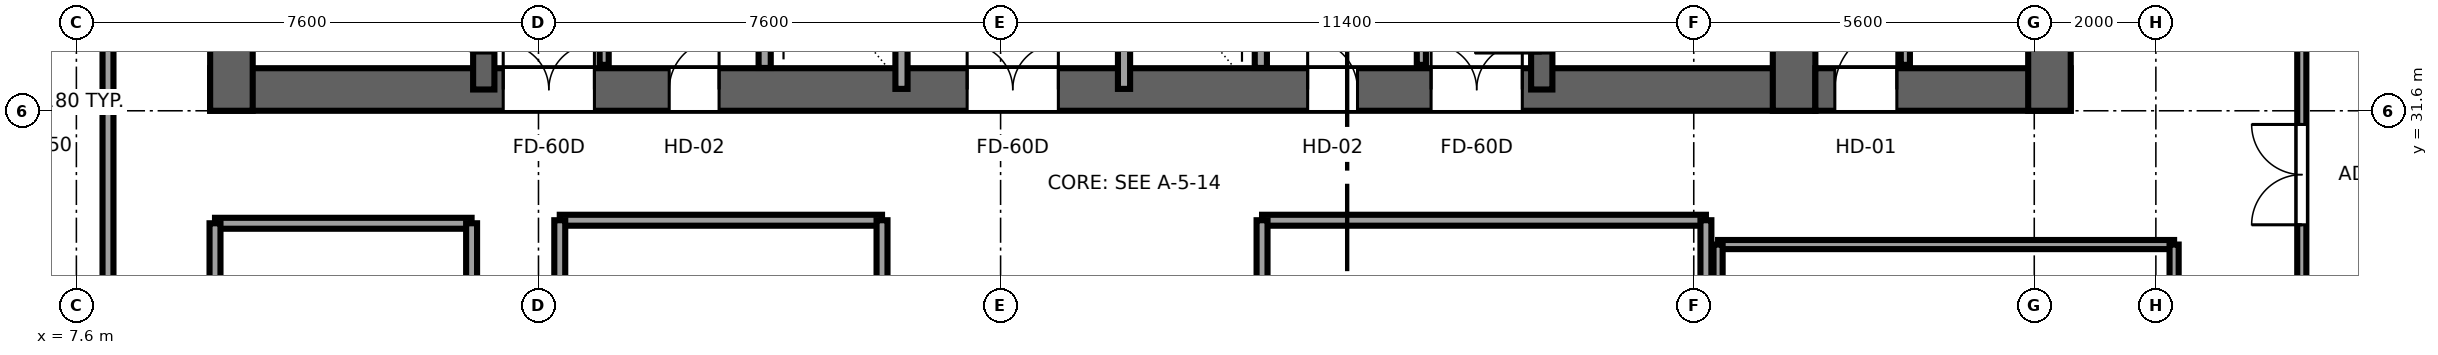
"""IFC4 building model, lengths in metres.
Left out: names, types, materials, properties, quantities, classifications, styles, units other than length and angle.
Written with IfcOpenShell. Run it as: python <this file> out.ifc"""

import sys

from ifc_helpers import new_model, si_unit, direction, frame, frame_2d, origin, place, context, subcontext, project, spatial, rectangle, extrude, source, transform, mapped, element, fill, save


model = new_model("IFC4")
c1 = context("Model", 3, precision=1e-05, world=origin(), true_north=direction((0.0, 1.0)))
c2 = subcontext(c1, "Body", "Model", "MODEL_VIEW")
j1 = project(units=[si_unit("LENGTHUNIT", "METRE"), si_unit("PLANEANGLEUNIT", "RADIAN")], contexts=[c1])
p1 = place(None, origin())
s1 = spatial("IfcSite", under=j1, at=p1, CompositionType="ELEMENT")
p2 = place(p1, origin())
s2 = spatial("IfcBuilding", under=s1, at=p2, CompositionType="ELEMENT")
p3 = place(p2, frame((0.0, 0.0, 191.1)))
s3 = spatial("IfcBuildingStorey", under=s2, at=p3, CompositionType="ELEMENT", Elevation=191.1)
p4 = place(p3, frame((9.8, 31.95, 0.0), z_axis=(0.0, 0.0, 1.0), x_axis=(1.0, 0.0, 0.0)))
e1 = element("IfcWall", 1, at=p4, inside=s3, PredefinedType="SHEAR", context=c2, shape_type="SweptSolid", body=[
    extrude(rectangle(XDim=26.4, YDim=0.7, at=frame_2d((13.2, 0.0))), origin(), (0.0, 0.0, 1.0), 3.55),
])
p5 = place(p4, frame((6.32, 0.0, 0.0), z_axis=(0.0, 0.0, 1.0), x_axis=(-1.0, 0.0, 0.0)))
e2 = element("IfcOpeningElement", 2, at=p5, cuts=e1, PredefinedType="OPENING", context=c2, shape_type="SweptSolid", body=[
    extrude(rectangle(XDim=1.5, YDim=2.04, at=frame_2d((0.75, 1.02))), frame((0.0, 0.36, 0.0), z_axis=(0.0, -1.0, 0.0), x_axis=(1.0, 0.0, 0.0)), (0.0, 0.0, 1.0), 0.72),
])
p6 = place(p4, frame((13.95, 0.0, 0.0), z_axis=(0.0, 0.0, 1.0), x_axis=(-1.0, 0.0, 0.0)))
e3 = element("IfcOpeningElement", 3, at=p6, cuts=e1, PredefinedType="OPENING", context=c2, shape_type="SweptSolid", body=[
    extrude(rectangle(XDim=1.5, YDim=2.04, at=frame_2d((0.75, 1.02))), frame((0.0, 0.36, 0.0), z_axis=(0.0, -1.0, 0.0), x_axis=(1.0, 0.0, 0.0)), (0.0, 0.0, 1.0), 0.72),
])
p7 = place(p4, frame((21.58, 0.0, 0.0), z_axis=(0.0, 0.0, 1.0), x_axis=(-1.0, 0.0, 0.0)))
e4 = element("IfcOpeningElement", 4, at=p7, cuts=e1, PredefinedType="OPENING", context=c2, shape_type="SweptSolid", body=[
    extrude(rectangle(XDim=1.5, YDim=2.04, at=frame_2d((0.75, 1.02))), frame((0.0, 0.36, 0.0), z_axis=(0.0, -1.0, 0.0), x_axis=(1.0, 0.0, 0.0)), (0.0, 0.0, 1.0), 0.72),
])
p8 = place(p4, frame((8.37, 0.0, 0.0), z_axis=(0.0, 0.0, 1.0), x_axis=(-1.0, 0.0, 0.0)))
e5 = element("IfcOpeningElement", 5, at=p8, cuts=e1, PredefinedType="OPENING", context=c2, shape_type="SweptSolid", body=[
    extrude(rectangle(XDim=0.82, YDim=2.01, at=frame_2d((0.41, 1.005))), frame((0.0, 0.36, 0.0), z_axis=(0.0, -1.0, 0.0), x_axis=(1.0, 0.0, 0.0)), (0.0, 0.0, 1.0), 0.72),
])
p9 = place(p4, frame((18.87, 0.0, 0.0), z_axis=(0.0, 0.0, 1.0), x_axis=(-1.0, 0.0, 0.0)))
e6 = element("IfcOpeningElement", 6, at=p9, cuts=e1, PredefinedType="OPENING", context=c2, shape_type="SweptSolid", body=[
    extrude(rectangle(XDim=0.82, YDim=2.01, at=frame_2d((0.41, 1.005))), frame((0.0, 0.36, 0.0), z_axis=(0.0, -1.0, 0.0), x_axis=(1.0, 0.0, 0.0)), (0.0, 0.0, 1.0), 0.72),
])
for number, where, z_axis, x_axis in (
    (7, (10.15, 31.6, 0.0), (0.0, 0.0, 1.0), (0.0, 1.0, 0.0)),
    (8, (35.85, 31.6, 0.0), (0.0, 0.0, 1.0), (0.0, 1.0, 0.0)),
):
    element("IfcWall", number, at=place(p3, frame(where, z_axis=z_axis, x_axis=x_axis)), inside=s3, PredefinedType="SHEAR", context=c2, shape_type="SweptSolid", body=[
        extrude(rectangle(XDim=13.6, YDim=0.7, at=frame_2d((6.8, 0.0))), origin(), (0.0, 0.0, 1.0), 3.55),
    ])
p10 = place(p3, frame((14.3, 31.95, 0.0), z_axis=(0.0, 0.0, 1.0), x_axis=(0.0, 1.0, 0.0)))
e9 = element("IfcWall", 9, at=p10, inside=s3, PredefinedType="SHEAR", context=c2, shape_type="SweptSolid", body=[
    extrude(rectangle(XDim=12.9, YDim=0.35, at=frame_2d((6.45, 0.0))), origin(), (0.0, 0.0, 1.0), 3.55),
])
p11 = place(p10, frame((0.6, 0.0, 0.0)))
e10 = element("IfcOpeningElement", 10, at=p11, cuts=e9, PredefinedType="OPENING", context=c2, shape_type="SweptSolid", body=[
    extrude(rectangle(XDim=1.1, YDim=2.12, at=frame_2d((0.55, 1.06))), frame((0.0, 0.185, 0.0), z_axis=(0.0, -1.0, 0.0), x_axis=(1.0, 0.0, 0.0)), (0.0, 0.0, 1.0), 0.37),
])
p12 = place(p3, frame((31.7, 31.95, 0.0), z_axis=(0.0, 0.0, 1.0), x_axis=(0.0, 1.0, 0.0)))
e11 = element("IfcWall", 11, at=p12, inside=s3, PredefinedType="SHEAR", context=c2, shape_type="SweptSolid", body=[
    extrude(rectangle(XDim=12.9, YDim=0.35, at=frame_2d((6.45, 0.0))), origin(), (0.0, 0.0, 1.0), 3.55),
])
p13 = place(p12, frame((1.7, 0.0, 0.0), z_axis=(0.0, 0.0, 1.0), x_axis=(-1.0, 0.0, 0.0)))
e12 = element("IfcOpeningElement", 12, at=p13, cuts=e11, PredefinedType="OPENING", context=c2, shape_type="SweptSolid", body=[
    extrude(rectangle(XDim=1.1, YDim=2.12, at=frame_2d((0.55, 1.06))), frame((0.0, 0.185, 0.0), z_axis=(0.0, -1.0, 0.0), x_axis=(1.0, 0.0, 0.0)), (0.0, 0.0, 1.0), 0.37),
])
p14 = place(p3, frame((36.2, 31.95, 0.0), z_axis=(0.0, 0.0, 1.0), x_axis=(1.0, 0.0, 0.0)))
e13 = element("IfcWall", 13, at=p14, inside=s3, PredefinedType="SHEAR", context=c2, shape_type="SweptSolid", body=[
    extrude(rectangle(XDim=4.2, YDim=0.7, at=frame_2d((2.1, 0.0))), origin(), (0.0, 0.0, 1.0), 3.55),
])
p15 = place(p14, frame((1.34, 0.0, 0.0), z_axis=(0.0, 0.0, 1.0), x_axis=(-1.0, 0.0, 0.0)))
e14 = element("IfcOpeningElement", 14, at=p15, cuts=e13, PredefinedType="OPENING", context=c2, shape_type="SweptSolid", body=[
    extrude(rectangle(XDim=1.02, YDim=2.03, at=frame_2d((0.51, 1.015))), frame((0.0, 0.36, 0.0), z_axis=(0.0, -1.0, 0.0), x_axis=(1.0, 0.0, 0.0)), (0.0, 0.0, 1.0), 0.72),
])
p16 = place(p3, frame((40.05, 31.6, 0.0), z_axis=(0.0, 0.0, 1.0), x_axis=(0.0, 1.0, 0.0)))
e15 = element("IfcWall", 15, at=p16, inside=s3, PredefinedType="SHEAR", context=c2, shape_type="SweptSolid", body=[
    extrude(rectangle(XDim=13.6, YDim=0.7, at=frame_2d((6.8, 0.0))), origin(), (0.0, 0.0, 1.0), 3.55),
])
for number, where, z_axis, x_axis in (
    (16, (18.92, 32.304, 0.0), (0.0, 0.0, 1.0), (0.0, 1.0, 0.0)),
    (17, (27.08, 32.304, 0.0), (0.0, 0.0, 1.0), (0.0, 1.0, 0.0)),
):
    element("IfcWall", number, at=place(p3, frame(where, z_axis=z_axis, x_axis=x_axis)), inside=s3, PredefinedType="SOLIDWALL", context=c2, shape_type="SweptSolid", body=[
        extrude(rectangle(XDim=3.846, YDim=0.2, at=frame_2d((1.923, 0.0))), origin(), (0.0, 0.0, 1.0), 3.37),
    ])
p17 = place(p3, frame((21.17, 31.96, 0.0), z_axis=(0.0, 0.0, 1.0), x_axis=(0.0, 1.0, 0.0)))
e18 = element("IfcWall", 18, at=p17, inside=s3, PredefinedType="SOLIDWALL", context=c2, shape_type="SweptSolid", body=[
    extrude(rectangle(XDim=12.58, YDim=0.2, at=frame_2d((6.29, 0.0))), origin(), (0.0, 0.0, 1.0), 3.37),
])
p18 = place(p17, frame((5.74, 0.0, 0.0)))
e19 = element("IfcOpeningElement", 19, at=p18, cuts=e18, PredefinedType="OPENING", context=c2, shape_type="SweptSolid", body=[
    extrude(rectangle(XDim=1.1, YDim=2.12, at=frame_2d((0.55, 1.06))), frame((0.0, 0.11, 0.0), z_axis=(0.0, -1.0, 0.0), x_axis=(1.0, 0.0, 0.0)), (0.0, 0.0, 1.0), 0.22),
])
p19 = place(p17, frame((8.24, 0.0, 0.0)))
e20 = element("IfcOpeningElement", 20, at=p19, cuts=e18, PredefinedType="OPENING", context=c2, shape_type="SweptSolid", body=[
    extrude(rectangle(XDim=1.1, YDim=2.12, at=frame_2d((0.55, 1.06))), frame((0.0, 0.11, 0.0), z_axis=(0.0, -1.0, 0.0), x_axis=(1.0, 0.0, 0.0)), (0.0, 0.0, 1.0), 0.22),
])
p20 = place(p3, frame((24.83, 31.96, 0.0), z_axis=(0.0, 0.0, 1.0), x_axis=(0.0, 1.0, 0.0)))
e21 = element("IfcWall", 21, at=p20, inside=s3, PredefinedType="SOLIDWALL", context=c2, shape_type="SweptSolid", body=[
    extrude(rectangle(XDim=12.58, YDim=0.2, at=frame_2d((6.29, 0.0))), origin(), (0.0, 0.0, 1.0), 3.37),
])
p21 = place(p20, frame((5.74, 0.0, 0.0)))
e22 = element("IfcOpeningElement", 22, at=p21, cuts=e21, PredefinedType="OPENING", context=c2, shape_type="SweptSolid", body=[
    extrude(rectangle(XDim=1.1, YDim=2.12, at=frame_2d((0.55, 1.06))), frame((0.0, 0.11, 0.0), z_axis=(0.0, -1.0, 0.0), x_axis=(1.0, 0.0, 0.0)), (0.0, 0.0, 1.0), 0.22),
])
p22 = place(p20, frame((8.24, 0.0, 0.0)))
e23 = element("IfcOpeningElement", 23, at=p22, cuts=e21, PredefinedType="OPENING", context=c2, shape_type="SweptSolid", body=[
    extrude(rectangle(XDim=1.1, YDim=2.12, at=frame_2d((0.55, 1.06))), frame((0.0, 0.11, 0.0), z_axis=(0.0, -1.0, 0.0), x_axis=(1.0, 0.0, 0.0)), (0.0, 0.0, 1.0), 0.22),
])
for number, where, z_axis, x_axis in (
    (24, (16.28, 32.355, 0.0), (0.0, 0.0, 1.0), (0.0, 1.0, 0.0)),
    (25, (29.72, 32.355, 0.0), (0.0, 0.0, 1.0), (0.0, 1.0, 0.0)),
):
    element("IfcWall", number, at=place(p3, frame(where, z_axis=z_axis, x_axis=x_axis)), inside=s3, PredefinedType="PARTITIONING", context=c2, shape_type="SweptSolid", body=[
        extrude(rectangle(XDim=0.865, YDim=0.15, at=frame_2d((0.433, 0.0))), origin(), (0.0, 0.0, 1.0), 3.37),
    ])
p23 = place(p3, frame((37.68, 32.355, 0.0), z_axis=(0.0, 0.0, 1.0), x_axis=(0.0, 1.0, 0.0)))
e26 = element("IfcWall", 26, at=p23, inside=s3, PredefinedType="PARTITIONING", context=c2, shape_type="SweptSolid", body=[
    extrude(rectangle(XDim=7.845, YDim=0.15, at=frame_2d((3.922, 0.0))), origin(), (0.0, 0.0, 1.0), 3.37),
])
p24 = place(p23, frame((3.413, 0.0, 0.0)))
e27 = element("IfcOpeningElement", 27, at=p24, cuts=e26, PredefinedType="OPENING", context=c2, shape_type="SweptSolid", body=[
    extrude(rectangle(XDim=1.02, YDim=2.03, at=frame_2d((0.51, 1.015))), frame((0.0, 0.085, 0.0), z_axis=(0.0, -1.0, 0.0), x_axis=(1.0, 0.0, 0.0)), (0.0, 0.0, 1.0), 0.17),
])
p25 = place(p3, frame((8.12, 22.7, 0.0), z_axis=(0.0, 0.0, 1.0), x_axis=(0.0, 1.0, 0.0)))
e28 = element("IfcWall", 28, at=p25, inside=s3, PredefinedType="PARTITIONING", context=c2, shape_type="SweptSolid", body=[
    extrude(rectangle(XDim=13.1, YDim=0.18, at=frame_2d((6.55, 0.0))), origin(), (0.0, 0.0, 1.0), 3.37),
])
p26 = place(p25, frame((3.35, 0.0, 0.0)))
e29 = element("IfcOpeningElement", 29, at=p26, cuts=e28, PredefinedType="OPENING", context=c2, shape_type="SweptSolid", body=[
    extrude(rectangle(XDim=1.65, YDim=2.15, at=frame_2d((0.825, 1.075))), frame((0.0, 0.1, 0.0), z_axis=(0.0, -1.0, 0.0), x_axis=(1.0, 0.0, 0.0)), (0.0, 0.0, 1.0), 0.2),
])
p27 = place(p3, frame((44.2, 26.5, 0.0), z_axis=(0.0, 0.0, 1.0), x_axis=(0.0, 1.0, 0.0)))
e30 = element("IfcWall", 30, at=p27, inside=s3, PredefinedType="PARTITIONING", context=c2, shape_type="SweptSolid", body=[
    extrude(rectangle(XDim=8.1, YDim=0.15, at=frame_2d((4.05, 0.0))), origin(), (0.0, 0.0, 1.0), 3.37),
])
p28 = place(p27, frame((3.225, 0.0, 0.0)))
e31 = element("IfcOpeningElement", 31, at=p28, cuts=e30, PredefinedType="OPENING", context=c2, shape_type="SweptSolid", body=[
    extrude(rectangle(XDim=1.65, YDim=2.15, at=frame_2d((0.825, 1.075))), frame((0.0, 0.085, 0.0), z_axis=(0.0, -1.0, 0.0), x_axis=(1.0, 0.0, 0.0)), (0.0, 0.0, 1.0), 0.17),
])
p29 = place(p3, frame((9.88, 29.75, 0.0), z_axis=(0.0, 0.0, 1.0), x_axis=(1.0, 0.0, 0.0)))
e32 = element("IfcWall", 32, at=p29, inside=s3, PredefinedType="PARTITIONING", context=c2, shape_type="SweptSolid", body=[
    extrude(rectangle(XDim=4.22, YDim=0.18, at=frame_2d((2.11, 0.0))), origin(), (0.0, 0.0, 1.0), 3.37),
])
for number, where, z_axis, x_axis in (
    (33, (9.88, 22.7, 0.0), (0.0, 0.0, 1.0), (0.0, 1.0, 0.0)),
    (34, (14.1, 22.7, 0.0), (0.0, 0.0, 1.0), (0.0, 1.0, 0.0)),
):
    element("IfcWall", number, at=place(p3, frame(where, z_axis=z_axis, x_axis=x_axis)), inside=s3, PredefinedType="PARTITIONING", context=c2, shape_type="SweptSolid", body=[
        extrude(rectangle(XDim=7.05, YDim=0.18, at=frame_2d((3.525, 0.0))), origin(), (0.0, 0.0, 1.0), 3.37),
    ])
p30 = place(p3, frame((27.1, 29.8, 0.0), z_axis=(0.0, 0.0, 1.0), x_axis=(1.0, 0.0, 0.0)))
e35 = element("IfcWall", 35, at=p30, inside=s3, PredefinedType="PARTITIONING", context=c2, shape_type="SweptSolid", body=[
    extrude(rectangle(XDim=7.3, YDim=0.18, at=frame_2d((3.65, 0.0))), origin(), (0.0, 0.0, 1.0), 3.37),
])
for number, where, z_axis, x_axis in (
    (36, (27.1, 22.7, 0.0), (0.0, 0.0, 1.0), (0.0, 1.0, 0.0)),
    (37, (34.4, 22.7, 0.0), (0.0, 0.0, 1.0), (0.0, 1.0, 0.0)),
):
    element("IfcWall", number, at=place(p3, frame(where, z_axis=z_axis, x_axis=x_axis)), inside=s3, PredefinedType="PARTITIONING", context=c2, shape_type="SweptSolid", body=[
        extrude(rectangle(XDim=7.1, YDim=0.18, at=frame_2d((3.55, 0.0))), origin(), (0.0, 0.0, 1.0), 3.37),
    ])
p31 = place(p3, frame((15.55, 29.8, 0.0), z_axis=(0.0, 0.0, 1.0), x_axis=(1.0, 0.0, 0.0)))
e38 = element("IfcWall", 38, at=p31, inside=s3, PredefinedType="PARTITIONING", context=c2, shape_type="SweptSolid", body=[
    extrude(rectangle(XDim=5.3, YDim=0.18, at=frame_2d((2.65, 0.0))), origin(), (0.0, 0.0, 1.0), 3.37),
])
for number, where, z_axis, x_axis in (
    (39, (15.55, 22.7, 0.0), (0.0, 0.0, 1.0), (0.0, 1.0, 0.0)),
    (40, (20.85, 22.7, 0.0), (0.0, 0.0, 1.0), (0.0, 1.0, 0.0)),
):
    element("IfcWall", number, at=place(p3, frame(where, z_axis=z_axis, x_axis=x_axis)), inside=s3, PredefinedType="PARTITIONING", context=c2, shape_type="SweptSolid", body=[
        extrude(rectangle(XDim=7.1, YDim=0.18, at=frame_2d((3.55, 0.0))), origin(), (0.0, 0.0, 1.0), 3.37),
    ])
p32 = place(p3, frame((34.6, 29.4, 0.0), z_axis=(0.0, 0.0, 1.0), x_axis=(1.0, 0.0, 0.0)))
e41 = element("IfcWall", 41, at=p32, inside=s3, PredefinedType="PARTITIONING", context=c2, shape_type="SweptSolid", body=[
    extrude(rectangle(XDim=7.5, YDim=0.15, at=frame_2d((3.75, 0.0))), origin(), (0.0, 0.0, 1.0), 3.37),
])
p33 = place(p3, frame((34.6, 22.7, 0.0), z_axis=(0.0, 0.0, 1.0), x_axis=(0.0, 1.0, 0.0)))
e42 = element("IfcWall", 42, at=p33, inside=s3, PredefinedType="PARTITIONING", context=c2, shape_type="SweptSolid", body=[
    extrude(rectangle(XDim=6.7, YDim=0.15, at=frame_2d((3.35, 0.0))), origin(), (0.0, 0.0, 1.0), 3.37),
])
p34 = place(p3, frame((42.1, 22.7, 0.0), z_axis=(0.0, 0.0, 1.0), x_axis=(0.0, 1.0, 0.0)))
e43 = element("IfcWall", 43, at=p34, inside=s3, PredefinedType="PARTITIONING", context=c2, shape_type="SweptSolid", body=[
    extrude(rectangle(XDim=6.7, YDim=0.15, at=frame_2d((3.35, 0.0))), origin(), (0.0, 0.0, 1.0), 2.16),
])
m1 = source(origin(), c2, "Body", "SweptSolid", [
    extrude(rectangle(XDim=1.1, YDim=2.12, at=frame_2d((0.55, 1.06))), frame((0.0, 0.025, 0.0), z_axis=(0.0, -1.0, 0.0), x_axis=(1.0, 0.0, 0.0)), (0.0, 0.0, 1.0), 0.05),
])
p35 = place(p11, origin())
e44 = element("IfcDoor", 44, at=p35, inside=s3, OperationType="SINGLE_SWING_RIGHT", PredefinedType="DOOR", context=c2, shape_type="MappedRepresentation", body=[
    mapped(m1, transform((0.0, 0.0, 0.0), x_axis=(1.0, 0.0, 0.0), y_axis=(0.0, 1.0, 0.0), z_axis=(0.0, 0.0, 1.0), scale=1.0)),
])
fill(e10, e44)
p36 = place(p13, origin())
e45 = element("IfcDoor", 45, at=p36, inside=s3, OperationType="SINGLE_SWING_LEFT", PredefinedType="DOOR", context=c2, shape_type="MappedRepresentation", body=[
    mapped(m1, transform((0.0, 0.0, 0.0), x_axis=(1.0, 0.0, 0.0), y_axis=(0.0, 1.0, 0.0), z_axis=(0.0, 0.0, 1.0), scale=1.0)),
])
fill(e12, e45)
m2 = source(origin(), c2, "Body", "SweptSolid", [
    extrude(rectangle(XDim=1.5, YDim=2.04, at=frame_2d((0.75, 1.02))), frame((0.0, 0.025, 0.0), z_axis=(0.0, -1.0, 0.0), x_axis=(1.0, 0.0, 0.0)), (0.0, 0.0, 1.0), 0.05),
])
p37 = place(p5, origin())
e46 = element("IfcDoor", 46, at=p37, inside=s3, OperationType="DOUBLE_DOOR_SINGLE_SWING", PredefinedType="DOOR", context=c2, shape_type="MappedRepresentation", body=[
    mapped(m2, transform((0.0, 0.0, 0.0), x_axis=(1.0, 0.0, 0.0), y_axis=(0.0, 1.0, 0.0), z_axis=(0.0, 0.0, 1.0), scale=1.0)),
])
fill(e2, e46)
p38 = place(p6, origin())
e47 = element("IfcDoor", 47, at=p38, inside=s3, OperationType="DOUBLE_DOOR_SINGLE_SWING", PredefinedType="DOOR", context=c2, shape_type="MappedRepresentation", body=[
    mapped(m2, transform((0.0, 0.0, 0.0), x_axis=(1.0, 0.0, 0.0), y_axis=(0.0, 1.0, 0.0), z_axis=(0.0, 0.0, 1.0), scale=1.0)),
])
fill(e3, e47)
p39 = place(p7, origin())
e48 = element("IfcDoor", 48, at=p39, inside=s3, OperationType="DOUBLE_DOOR_SINGLE_SWING", PredefinedType="DOOR", context=c2, shape_type="MappedRepresentation", body=[
    mapped(m2, transform((0.0, 0.0, 0.0), x_axis=(1.0, 0.0, 0.0), y_axis=(0.0, 1.0, 0.0), z_axis=(0.0, 0.0, 1.0), scale=1.0)),
])
fill(e4, e48)
m3 = source(origin(), c2, "Body", "SweptSolid", [
    extrude(rectangle(XDim=0.82, YDim=2.01, at=frame_2d((0.41, 1.005))), frame((0.0, 0.025, 0.0), z_axis=(0.0, -1.0, 0.0), x_axis=(1.0, 0.0, 0.0)), (0.0, 0.0, 1.0), 0.05),
])
p40 = place(p8, origin())
e49 = element("IfcDoor", 49, at=p40, inside=s3, OperationType="SINGLE_SWING_RIGHT", PredefinedType="DOOR", context=c2, shape_type="MappedRepresentation", body=[
    mapped(m3, transform((0.0, 0.0, 0.0), x_axis=(1.0, 0.0, 0.0), y_axis=(0.0, 1.0, 0.0), z_axis=(0.0, 0.0, 1.0), scale=1.0)),
])
fill(e5, e49)
p41 = place(p9, origin())
e50 = element("IfcDoor", 50, at=p41, inside=s3, OperationType="SINGLE_SWING_LEFT", PredefinedType="DOOR", context=c2, shape_type="MappedRepresentation", body=[
    mapped(m3, transform((0.0, 0.0, 0.0), x_axis=(1.0, 0.0, 0.0), y_axis=(0.0, 1.0, 0.0), z_axis=(0.0, 0.0, 1.0), scale=1.0)),
])
fill(e6, e50)
m4 = source(origin(), c2, "Body", "SweptSolid", [
    extrude(rectangle(XDim=1.02, YDim=2.03, at=frame_2d((0.51, 1.015))), frame((0.0, 0.025, 0.0), z_axis=(0.0, -1.0, 0.0), x_axis=(1.0, 0.0, 0.0)), (0.0, 0.0, 1.0), 0.05),
])
p42 = place(p15, origin())
e51 = element("IfcDoor", 51, at=p42, inside=s3, OperationType="SINGLE_SWING_RIGHT", PredefinedType="DOOR", context=c2, shape_type="MappedRepresentation", body=[
    mapped(m4, transform((0.0, 0.0, 0.0), x_axis=(1.0, 0.0, 0.0), y_axis=(0.0, 1.0, 0.0), z_axis=(0.0, 0.0, 1.0), scale=1.0)),
])
fill(e14, e51)
m5 = source(origin(), c2, "Body", "SweptSolid", [
    extrude(rectangle(XDim=1.65, YDim=2.15, at=frame_2d((0.825, 1.075))), frame((0.0, 0.025, 0.0), z_axis=(0.0, -1.0, 0.0), x_axis=(1.0, 0.0, 0.0)), (0.0, 0.0, 1.0), 0.05),
])
p43 = place(p28, origin())
e52 = element("IfcDoor", 52, at=p43, inside=s3, OperationType="DOUBLE_DOOR_SINGLE_SWING", PredefinedType="DOOR", context=c2, shape_type="MappedRepresentation", body=[
    mapped(m5, transform((0.0, 0.0, 0.0), x_axis=(1.0, 0.0, 0.0), y_axis=(0.0, 1.0, 0.0), z_axis=(0.0, 0.0, 1.0), scale=1.0)),
])
fill(e31, e52)
save(model, sys.argv[1])
